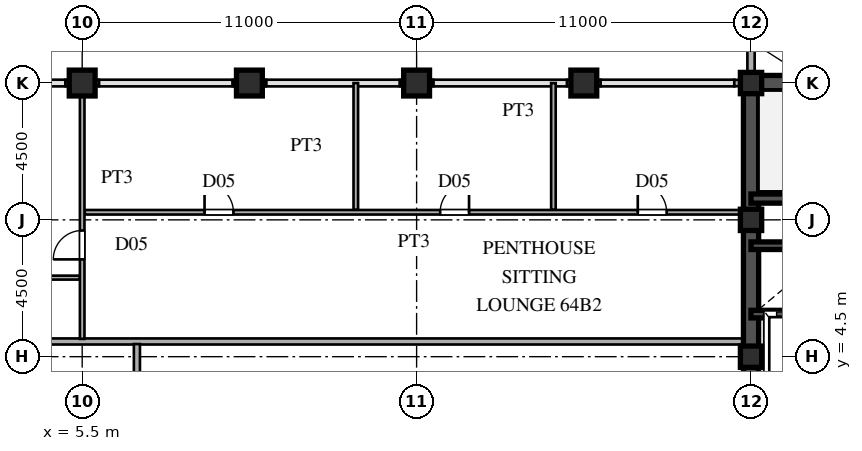
"""IFC4 building model, lengths in metres.
Left out: names, types, materials, properties, quantities, classifications, styles, units other than length and angle.
Written with IfcOpenShell. Run it as: python <this file> out.ifc"""

import sys

from ifc_helpers import new_model, si_unit, direction, frame, frame_2d, origin, origin_2d, place, context, subcontext, project, spatial, rectangle, hollow_rectangle, extrude, source, transform, mapped, element, fill, save


model = new_model("IFC4")
c1 = context("Model", 3, precision=1e-05, world=origin(), true_north=direction((0.0, 1.0)))
c2 = subcontext(c1, "Body", "Model", "MODEL_VIEW")
j1 = project(units=[si_unit("LENGTHUNIT", "METRE"), si_unit("PLANEANGLEUNIT", "RADIAN")], contexts=[c1])
p1 = place(None, origin())
s1 = spatial("IfcSite", under=j1, at=p1, CompositionType="ELEMENT")
p2 = place(p1, origin())
s2 = spatial("IfcBuilding", under=s1, at=p2, CompositionType="ELEMENT")
p3 = place(p2, frame((0.0, 0.0, 243.15)))
s3 = spatial("IfcBuildingStorey", under=s2, at=p3, CompositionType="ELEMENT", Elevation=243.15)
m1 = source(origin(), c2, "Body", "SweptSolid", [
    extrude(hollow_rectangle(XDim=0.7, YDim=0.7, WallThickness=0.03, at=origin_2d()), origin(), (0.0, 0.0, 1.0), 3.75),
])
for number, where, z_axis, x_axis in (
    (1, (27.5, 4.5, 0.0), (0.0, 0.0, 1.0), (1.0, 0.0, 0.0)),
    (2, (27.5, 9.0, 0.0), (0.0, 0.0, 1.0), (1.0, 0.0, 0.0)),
    (3, (27.5, 13.5, 0.0), (0.0, 0.0, 1.0), (1.0, 0.0, 0.0)),
):
    element("IfcColumn", number, at=place(p3, frame(where, z_axis=z_axis, x_axis=x_axis)), inside=s3, PredefinedType="COLUMN", context=c2, shape_type="MappedRepresentation", body=[
        mapped(m1, transform((0.0, 0.0, 0.0), scale=1.0)),
    ])
m2 = source(origin(), c2, "Body", "SweptSolid", [
    extrude(hollow_rectangle(XDim=0.85, YDim=0.85, WallThickness=0.036, at=origin_2d()), origin(), (0.0, 0.0, 1.0), 3.75),
])
for number, where, z_axis, x_axis in (
    (4, (5.5, 13.5, 0.0), (0.0, 0.0, 1.0), (1.0, 0.0, 0.0)),
    (5, (11.0, 13.5, 0.0), (0.0, 0.0, 1.0), (1.0, 0.0, 0.0)),
    (6, (16.5, 13.5, 0.0), (0.0, 0.0, 1.0), (1.0, 0.0, 0.0)),
    (7, (22.0, 13.5, 0.0), (0.0, 0.0, 1.0), (1.0, 0.0, 0.0)),
):
    element("IfcColumn", number, at=place(p3, frame(where, z_axis=z_axis, x_axis=x_axis)), inside=s3, PredefinedType="COLUMN", context=c2, shape_type="MappedRepresentation", body=[
        mapped(m2, transform((0.0, 0.0, 0.0), scale=1.0)),
    ])
p4 = place(p3, frame((27.5, 13.755, 0.0), z_axis=(0.0, 0.0, 1.0), x_axis=(0.0, 1.0, 0.0)))
e8 = element("IfcWall", 8, at=p4, inside=s3, PredefinedType="SOLIDWALL", context=c2, shape_type="SweptSolid", body=[
    extrude(rectangle(XDim=0.62, YDim=0.24, at=frame_2d((0.31, 0.0))), origin(), (0.0, 0.0, 1.0), 3.03),
])
p5 = place(p3, frame((27.5, 14.375, 0.0), z_axis=(0.0, 0.0, 1.0), x_axis=(0.0, 1.0, 0.0)))
e9 = element("IfcWall", 9, at=p5, inside=s3, PredefinedType="SOLIDWALL", context=c2, shape_type="SweptSolid", body=[
    extrude(rectangle(XDim=1.605, YDim=0.24, at=frame_2d((0.803, 0.0))), origin(), (0.0, 0.0, 1.0), 3.53),
])
for number, where, z_axis, x_axis in (
    (10, (4.95, 13.5, 0.0), (0.0, 0.0, 1.0), (1.0, 0.0, 0.0)),
    (11, (10.45, 13.5, 0.0), (0.0, 0.0, 1.0), (1.0, 0.0, 0.0)),
    (12, (15.95, 13.5, 0.0), (0.0, 0.0, 1.0), (1.0, 0.0, 0.0)),
    (13, (21.45, 13.5, 0.0), (0.0, 0.0, 1.0), (1.0, 0.0, 0.0)),
):
    element("IfcWall", number, at=place(p3, frame(where, z_axis=z_axis, x_axis=x_axis)), inside=s3, PredefinedType="SOLIDWALL", context=c2, shape_type="SweptSolid", body=[
        extrude(rectangle(XDim=1.1, YDim=0.21, at=frame_2d((0.55, 0.0))), origin(), (0.0, 0.0, 1.0), 3.03),
    ])
p6 = place(p3, frame((26.95, 13.5, 0.0), z_axis=(0.0, 0.0, 1.0), x_axis=(1.0, 0.0, 0.0)))
e14 = element("IfcWall", 14, at=p6, inside=s3, PredefinedType="SOLIDWALL", context=c2, shape_type="SweptSolid", body=[
    extrude(rectangle(XDim=0.54, YDim=0.21, at=frame_2d((0.27, 0.0))), origin(), (0.0, 0.0, 1.0), 3.03),
])
p7 = place(p3, frame((27.5, 1.3, 0.0), z_axis=(0.0, 0.0, 1.0), x_axis=(0.0, 1.0, 0.0)))
e15 = element("IfcWall", 15, at=p7, inside=s3, PredefinedType="SHEAR", context=c2, shape_type="SweptSolid", body=[
    extrude(rectangle(XDim=12.2, YDim=0.5, at=frame_2d((6.1, 0.0))), origin(), (0.0, 0.0, 1.0), 3.53),
])
p8 = place(p3, frame((27.5, 13.5, 0.0), z_axis=(0.0, 0.0, 1.0), x_axis=(1.0, 0.0, 0.0)))
e16 = element("IfcWall", 16, at=p8, inside=s3, PredefinedType="SHEAR", context=c2, shape_type="SweptSolid", body=[
    extrude(rectangle(XDim=9.0, YDim=0.5, at=frame_2d((4.5, 0.0))), origin(), (0.0, 0.0, 1.0), 3.53),
])
p9 = place(p3, frame((27.5, 9.7, 0.0), z_axis=(0.0, 0.0, 1.0), x_axis=(1.0, 0.0, 0.0)))
e17 = element("IfcWall", 17, at=p9, inside=s3, PredefinedType="SHEAR", context=c2, shape_type="SweptSolid", body=[
    extrude(rectangle(XDim=9.0, YDim=0.3, at=frame_2d((4.5, 0.0))), origin(), (0.0, 0.0, 1.0), 3.53),
])
p10 = place(p9, frame((7.3, 0.0, 0.0)))
e18 = element("IfcOpeningElement", 18, at=p10, cuts=e17, PredefinedType="OPENING", context=c2, shape_type="SweptSolid", body=[
    extrude(rectangle(XDim=1.1, YDim=2.2, at=frame_2d((0.55, 1.1))), frame((0.0, 0.16, 0.0), z_axis=(0.0, -1.0, 0.0), x_axis=(1.0, 0.0, 0.0)), (0.0, 0.0, 1.0), 0.32),
])
for number, where, z_axis, x_axis in (
    (19, (27.5, 5.9, 0.0), (0.0, 0.0, 1.0), (1.0, 0.0, 0.0)),
    (20, (27.5, 8.15, 0.0), (0.0, 0.0, 1.0), (1.0, 0.0, 0.0)),
):
    element("IfcWall", number, at=place(p3, frame(where, z_axis=z_axis, x_axis=x_axis)), inside=s3, PredefinedType="SHEAR", context=c2, shape_type="SweptSolid", body=[
        extrude(rectangle(XDim=2.8, YDim=0.25, at=frame_2d((1.4, 0.0))), origin(), (0.0, 0.0, 1.0), 3.53),
    ])
p11 = place(p3, frame((-27.245, 5.0, 0.0), z_axis=(0.0, 0.0, 1.0), x_axis=(1.0, 0.0, 0.0)))
e21 = element("IfcWall", 21, at=p11, inside=s3, PredefinedType="PARTITIONING", context=c2, shape_type="SweptSolid", body=[
    extrude(rectangle(XDim=54.49, YDim=0.2, at=frame_2d((27.245, 0.0))), origin(), (0.0, 0.0, 1.0), 3.53),
])
p12 = place(p11, frame((23.47, 0.0, 0.0)))
e22 = element("IfcOpeningElement", 22, at=p12, cuts=e21, PredefinedType="OPENING", context=c2, shape_type="SweptSolid", body=[
    extrude(rectangle(XDim=1.05, YDim=2.25, at=frame_2d((0.525, 1.125))), frame((0.0, 0.11, 0.0), z_axis=(0.0, -1.0, 0.0), x_axis=(1.0, 0.0, 0.0)), (0.0, 0.0, 1.0), 0.22),
])
p13 = place(p3, frame((0.085, 7.1, 0.0), z_axis=(0.0, 0.0, 1.0), x_axis=(1.0, 0.0, 0.0)))
e23 = element("IfcWall", 23, at=p13, inside=s3, PredefinedType="PARTITIONING", context=c2, shape_type="SweptSolid", body=[
    extrude(rectangle(XDim=5.33, YDim=0.13, at=frame_2d((2.665, 0.0))), origin(), (0.0, 0.0, 1.0), 3.53),
])
p14 = place(p3, frame((5.585, 9.25, 0.0), z_axis=(0.0, 0.0, 1.0), x_axis=(1.0, 0.0, 0.0)))
e24 = element("IfcWall", 24, at=p14, inside=s3, PredefinedType="PARTITIONING", context=c2, shape_type="SweptSolid", body=[
    extrude(rectangle(XDim=21.66, YDim=0.15, at=frame_2d((10.83, 0.0))), origin(), (0.0, 0.0, 1.0), 3.53),
])
p15 = place(p14, frame((3.94, 0.0, 0.0)))
e25 = element("IfcOpeningElement", 25, at=p15, cuts=e24, PredefinedType="OPENING", context=c2, shape_type="SweptSolid", body=[
    extrude(rectangle(XDim=0.95, YDim=2.15, at=frame_2d((0.475, 1.075))), frame((0.0, 0.085, 0.0), z_axis=(0.0, -1.0, 0.0), x_axis=(1.0, 0.0, 0.0)), (0.0, 0.0, 1.0), 0.17),
])
p16 = place(p14, frame((11.69, 0.0, 0.0)))
e26 = element("IfcOpeningElement", 26, at=p16, cuts=e24, PredefinedType="OPENING", context=c2, shape_type="SweptSolid", body=[
    extrude(rectangle(XDim=0.95, YDim=2.15, at=frame_2d((0.475, 1.075))), frame((0.0, 0.085, 0.0), z_axis=(0.0, -1.0, 0.0), x_axis=(1.0, 0.0, 0.0)), (0.0, 0.0, 1.0), 0.17),
])
p17 = place(p14, frame((18.19, 0.0, 0.0)))
e27 = element("IfcOpeningElement", 27, at=p17, cuts=e24, PredefinedType="OPENING", context=c2, shape_type="SweptSolid", body=[
    extrude(rectangle(XDim=0.95, YDim=2.15, at=frame_2d((0.475, 1.075))), frame((0.0, 0.085, 0.0), z_axis=(0.0, -1.0, 0.0), x_axis=(1.0, 0.0, 0.0)), (0.0, 0.0, 1.0), 0.17),
])
p18 = place(p3, frame((5.5, 5.085, 0.0), z_axis=(0.0, 0.0, 1.0), x_axis=(0.0, 1.0, 0.0)))
e28 = element("IfcWall", 28, at=p18, inside=s3, PredefinedType="PARTITIONING", context=c2, shape_type="SweptSolid", body=[
    extrude(rectangle(XDim=8.305, YDim=0.15, at=frame_2d((4.152, 0.0))), origin(), (0.0, 0.0, 1.0), 2.43),
])
p19 = place(p18, frame((2.615, 0.0, 0.0)))
e29 = element("IfcOpeningElement", 29, at=p19, cuts=e28, PredefinedType="OPENING", context=c2, shape_type="SweptSolid", body=[
    extrude(rectangle(XDim=0.95, YDim=2.15, at=frame_2d((0.475, 1.075))), frame((0.0, 0.085, 0.0), z_axis=(0.0, -1.0, 0.0), x_axis=(1.0, 0.0, 0.0)), (0.0, 0.0, 1.0), 0.17),
])
p20 = place(p3, frame((7.3, 1.435, 0.0), z_axis=(0.0, 0.0, 1.0), x_axis=(0.0, 1.0, 0.0)))
e30 = element("IfcWall", 30, at=p20, inside=s3, PredefinedType="PARTITIONING", context=c2, shape_type="SweptSolid", body=[
    extrude(rectangle(XDim=3.48, YDim=0.2, at=frame_2d((1.74, 0.0))), origin(), (0.0, 0.0, 1.0), 3.53),
])
for number, where, z_axis, x_axis in (
    (31, (14.5, 9.335, 0.0), (0.0, 0.0, 1.0), (0.0, 1.0, 0.0)),
    (32, (21.0, 9.335, 0.0), (0.0, 0.0, 1.0), (0.0, 1.0, 0.0)),
):
    element("IfcWall", number, at=place(p3, frame(where, z_axis=z_axis, x_axis=x_axis)), inside=s3, PredefinedType="PARTITIONING", context=c2, shape_type="SweptSolid", body=[
        extrude(rectangle(XDim=4.165, YDim=0.15, at=frame_2d((2.083, 0.0))), origin(), (0.0, 0.0, 1.0), 3.53),
    ])
m3 = source(origin(), c2, "Body", "SweptSolid", [
    extrude(rectangle(XDim=0.95, YDim=2.15, at=frame_2d((0.475, 1.075))), frame((0.0, 0.025, 0.0), z_axis=(0.0, -1.0, 0.0), x_axis=(1.0, 0.0, 0.0)), (0.0, 0.0, 1.0), 0.05),
])
p21 = place(p15, origin())
e33 = element("IfcDoor", 33, at=p21, inside=s3, OperationType="SINGLE_SWING_LEFT", PredefinedType="DOOR", context=c2, shape_type="MappedRepresentation", body=[
    mapped(m3, transform((0.0, 0.0, 0.0), scale=1.0)),
])
fill(e25, e33)
p22 = place(p16, origin())
e34 = element("IfcDoor", 34, at=p22, inside=s3, OperationType="SINGLE_SWING_RIGHT", PredefinedType="DOOR", context=c2, shape_type="MappedRepresentation", body=[
    mapped(m3, transform((0.0, 0.0, 0.0), scale=1.0)),
])
fill(e26, e34)
p23 = place(p17, origin())
e35 = element("IfcDoor", 35, at=p23, inside=s3, OperationType="SINGLE_SWING_LEFT", PredefinedType="DOOR", context=c2, shape_type="MappedRepresentation", body=[
    mapped(m3, transform((0.0, 0.0, 0.0), scale=1.0)),
])
fill(e27, e35)
p24 = place(p19, origin())
e36 = element("IfcDoor", 36, at=p24, inside=s3, OperationType="SINGLE_SWING_LEFT", PredefinedType="DOOR", context=c2, shape_type="MappedRepresentation", body=[
    mapped(m3, transform((0.0, 0.0, 0.0), scale=1.0)),
])
fill(e29, e36)
save(model, sys.argv[1])
